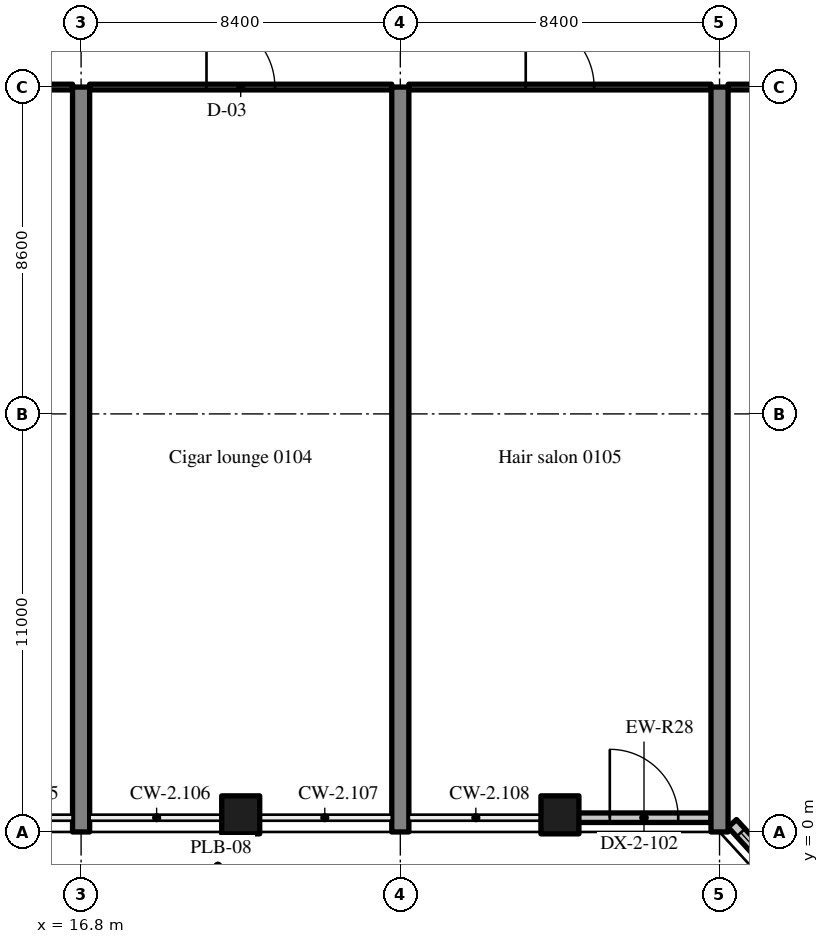
"""IFC4 building model, lengths in metres.
Left out: names, types, materials, properties, quantities, classifications, styles, units other than length and angle.
Written with IfcOpenShell. Run it as: python <this file> out.ifc"""

import sys

from ifc_helpers import new_model, si_unit, direction, frame, frame_2d, origin, origin_2d, place, context, subcontext, project, spatial, rectangle, extrude, source, transform, mapped, element, fill, save


model = new_model("IFC4")
c1 = context("Model", 3, precision=1e-05, world=origin(), true_north=direction((0.0, 1.0)))
c2 = subcontext(c1, "Body", "Model", "MODEL_VIEW")
j1 = project(units=[si_unit("LENGTHUNIT", "METRE"), si_unit("PLANEANGLEUNIT", "RADIAN")], contexts=[c1])
p1 = place(None, origin())
s1 = spatial("IfcSite", under=j1, at=p1, CompositionType="ELEMENT")
p2 = place(p1, origin())
s2 = spatial("IfcBuilding", under=s1, at=p2, CompositionType="ELEMENT")
p3 = place(p2, frame((0.0, 0.0, 6.0)))
s3 = spatial("IfcBuildingStorey", under=s2, at=p3, CompositionType="ELEMENT", Elevation=6.0)
m1 = source(origin(), c2, "Body", "SweptSolid", [
    extrude(rectangle(XDim=19.6, YDim=0.45, at=frame_2d((9.8, 0.0))), origin(), (0.0, 0.0, 1.0), 5.12),
])
for number, where, z_axis, x_axis in (
    (1, (16.8, 0.0, 0.0), (0.0, 0.0, 1.0), (0.0, 1.0, 0.0)),
    (2, (25.2, 0.0, 0.0), (0.0, 0.0, 1.0), (0.0, 1.0, 0.0)),
    (3, (33.6, 0.0, 0.0), (0.0, 0.0, 1.0), (0.0, 1.0, 0.0)),
):
    element("IfcWall", number, at=place(p3, frame(where, z_axis=z_axis, x_axis=x_axis)), inside=s3, PredefinedType="SHEAR", context=c2, shape_type="MappedRepresentation", body=[
        mapped(m1, transform((0.0, 0.0, 0.0), scale=1.0)),
    ])
m2 = source(origin(), c2, "Body", "SweptSolid", [
    extrude(rectangle(XDim=1.0, YDim=1.0, at=origin_2d()), origin(), (0.0, 0.0, 1.0), 5.12),
])
for number, where, z_axis, x_axis in (
    (4, (21.0, 0.45, 0.0), (0.0, 0.0, 1.0), (1.0, 0.0, 0.0)),
    (5, (29.4, 0.45, 0.0), (0.0, 0.0, 1.0), (1.0, 0.0, 0.0)),
):
    element("IfcColumn", number, at=place(p3, frame(where, z_axis=z_axis, x_axis=x_axis)), inside=s3, PredefinedType="COLUMN", context=c2, shape_type="MappedRepresentation", body=[
        mapped(m2, transform((0.0, 0.0, 0.0), scale=1.0)),
    ])
m3 = source(origin(), c2, "Body", "SweptSolid", [
    extrude(rectangle(XDim=3.525, YDim=0.25, at=frame_2d((1.762, 0.0))), origin(), (0.0, 0.0, 1.0), 4.37),
])
p4 = place(p3, frame((29.85, 0.375, 0.0), z_axis=(0.0, 0.0, 1.0), x_axis=(1.0, 0.0, 0.0)))
e6 = element("IfcWall", 6, at=p4, inside=s3, PredefinedType="SOLIDWALL", context=c2, shape_type="MappedRepresentation", body=[
    mapped(m3, transform((0.0, 0.0, 0.0), scale=1.0)),
])
m4 = source(origin(), c2, "Body", "SweptSolid", [
    extrude(rectangle(XDim=1.8, YDim=2.4, at=frame_2d((0.9, 1.2))), frame((0.0, 0.135, 0.0), z_axis=(0.0, -1.0, 0.0), x_axis=(1.0, 0.0, 0.0)), (0.0, 0.0, 1.0), 0.27),
])
p5 = place(p4, frame((0.863, 0.0, 0.0)))
e7 = element("IfcOpeningElement", 7, at=p5, cuts=e6, PredefinedType="OPENING", context=c2, shape_type="MappedRepresentation", body=[
    mapped(m4, transform((0.0, 0.0, 0.0), scale=1.0)),
])
m5 = source(origin(), c2, "Body", "SweptSolid", [
    extrude(rectangle(XDim=2.162, YDim=0.3, at=frame_2d((1.081, 0.0))), origin(), (0.0, 0.0, 1.0), 5.12),
])
p6 = place(p3, frame((33.936, 0.226, 0.0), z_axis=(0.0, 0.0, 1.0), x_axis=(0.67537173084, -0.737477474355, 0.0)))
e8 = element("IfcWall", 8, at=p6, inside=s3, PredefinedType="SOLIDWALL", context=c2, shape_type="MappedRepresentation", body=[
    mapped(m5, transform((0.0, 0.0, 0.0), scale=1.0)),
])
m6 = source(origin(), c2, "Body", "SweptSolid", [
    extrude(rectangle(XDim=1.5, YDim=2.0, at=frame_2d((0.75, 1.0))), frame((0.0, 0.16, 0.0), z_axis=(0.0, -1.0, 0.0), x_axis=(1.0, 0.0, 0.0)), (0.0, 0.0, 1.0), 0.32),
])
p7 = place(p6, frame((0.331, 0.0, 0.9)))
e9 = element("IfcOpeningElement", 9, at=p7, cuts=e8, PredefinedType="OPENING", context=c2, shape_type="MappedRepresentation", body=[
    mapped(m6, transform((0.0, 0.0, 0.0), scale=1.0)),
])
m7 = source(origin(), c2, "Body", "SweptSolid", [
    extrude(rectangle(XDim=7.95, YDim=0.15, at=frame_2d((3.975, 0.0))), origin(), (0.0, 0.0, 1.0), 4.42),
])
p8 = place(p3, frame((8.625, 19.6, 0.0), z_axis=(0.0, 0.0, 1.0), x_axis=(1.0, 0.0, 0.0)))
e10 = element("IfcWall", 10, at=p8, inside=s3, PredefinedType="PARTITIONING", context=c2, shape_type="MappedRepresentation", body=[
    mapped(m7, transform((0.0, 0.0, 0.0), scale=1.0)),
])
m8 = source(origin(), c2, "Body", "SweptSolid", [
    extrude(rectangle(XDim=1.8, YDim=2.1, at=frame_2d((0.9, 1.05))), frame((0.0, 0.085, 0.0), z_axis=(0.0, -1.0, 0.0), x_axis=(1.0, 0.0, 0.0)), (0.0, 0.0, 1.0), 0.17),
])
p9 = place(p8, frame((3.075, 0.0, 0.0)))
e11 = element("IfcOpeningElement", 11, at=p9, cuts=e10, PredefinedType="OPENING", context=c2, shape_type="MappedRepresentation", body=[
    mapped(m8, transform((0.0, 0.0, 0.0), scale=1.0)),
])
m9 = source(origin(), c2, "Body", "SweptSolid", [
    extrude(rectangle(XDim=7.95, YDim=0.15, at=frame_2d((3.975, 0.0))), origin(), (0.0, 0.0, 1.0), 4.42),
])
p10 = place(p3, frame((17.025, 19.6, 0.0), z_axis=(0.0, 0.0, 1.0), x_axis=(1.0, 0.0, 0.0)))
e12 = element("IfcWall", 12, at=p10, inside=s3, PredefinedType="PARTITIONING", context=c2, shape_type="MappedRepresentation", body=[
    mapped(m9, transform((0.0, 0.0, 0.0), scale=1.0)),
])
p11 = place(p10, frame((3.075, 0.0, 0.0)))
e13 = element("IfcOpeningElement", 13, at=p11, cuts=e12, PredefinedType="OPENING", context=c2, shape_type="MappedRepresentation", body=[
    mapped(m8, transform((0.0, 0.0, 0.0), scale=1.0)),
])
p12 = place(p3, frame((25.425, 19.6, 0.0), z_axis=(0.0, 0.0, 1.0), x_axis=(1.0, 0.0, 0.0)))
e14 = element("IfcWall", 14, at=p12, inside=s3, PredefinedType="PARTITIONING", context=c2, shape_type="MappedRepresentation", body=[
    mapped(m7, transform((0.0, 0.0, 0.0), scale=1.0)),
])
p13 = place(p12, frame((3.075, 0.0, 0.0)))
e15 = element("IfcOpeningElement", 15, at=p13, cuts=e14, PredefinedType="OPENING", context=c2, shape_type="MappedRepresentation", body=[
    mapped(m8, transform((0.0, 0.0, 0.0), scale=1.0)),
])
p14 = place(p3, frame((33.825, 19.6, 0.0), z_axis=(0.0, 0.0, 1.0), x_axis=(1.0, 0.0, 0.0)))
e16 = element("IfcWall", 16, at=p14, inside=s3, PredefinedType="PARTITIONING", context=c2, shape_type="MappedRepresentation", body=[
    mapped(m7, transform((0.0, 0.0, 0.0), scale=1.0)),
])
p15 = place(p14, frame((3.075, 0.0, 0.0)))
e17 = element("IfcOpeningElement", 17, at=p15, cuts=e16, PredefinedType="OPENING", context=c2, shape_type="MappedRepresentation", body=[
    mapped(m8, transform((0.0, 0.0, 0.0), scale=1.0)),
])
m10 = source(origin(), c2, "Body", "SweptSolid", [
    extrude(rectangle(XDim=1.8, YDim=2.4, at=frame_2d((0.9, 1.2))), frame((0.0, 0.025, 0.0), z_axis=(0.0, -1.0, 0.0), x_axis=(1.0, 0.0, 0.0)), (0.0, 0.0, 1.0), 0.05),
])
p16 = place(p5, origin())
e18 = element("IfcDoor", 18, at=p16, inside=s3, OperationType="DOUBLE_DOOR_SINGLE_SWING", PredefinedType="DOOR", context=c2, shape_type="MappedRepresentation", body=[
    mapped(m10, transform((0.0, 0.0, 0.0), scale=1.0)),
])
fill(e7, e18)
m11 = source(origin(), c2, "Body", "SweptSolid", [
    extrude(rectangle(XDim=1.5, YDim=2.0, at=frame_2d((0.75, 1.0))), frame((0.0, 0.03, 0.0), z_axis=(0.0, -1.0, 0.0), x_axis=(1.0, 0.0, 0.0)), (0.0, 0.0, 1.0), 0.06),
])
p17 = place(p7, origin())
e19 = element("IfcWindow", 19, at=p17, inside=s3, PartitioningType="SINGLE_PANEL", PredefinedType="WINDOW", context=c2, shape_type="MappedRepresentation", body=[
    mapped(m11, transform((0.0, 0.0, 0.0), scale=1.0)),
])
fill(e9, e19)
m12 = source(origin(), c2, "Body", "SweptSolid", [
    extrude(rectangle(XDim=1.8, YDim=2.1, at=frame_2d((0.9, 1.05))), frame((0.0, 0.025, 0.0), z_axis=(0.0, -1.0, 0.0), x_axis=(1.0, 0.0, 0.0)), (0.0, 0.0, 1.0), 0.05),
])
p18 = place(p11, origin())
e20 = element("IfcDoor", 20, at=p18, inside=s3, OperationType="DOUBLE_DOOR_SINGLE_SWING", PredefinedType="DOOR", context=c2, shape_type="MappedRepresentation", body=[
    mapped(m12, transform((0.0, 0.0, 0.0), scale=1.0)),
])
fill(e13, e20)
p19 = place(p13, origin())
e21 = element("IfcDoor", 21, at=p19, inside=s3, OperationType="DOUBLE_DOOR_SINGLE_SWING", PredefinedType="DOOR", context=c2, shape_type="MappedRepresentation", body=[
    mapped(m12, transform((0.0, 0.0, 0.0), scale=1.0)),
])
fill(e15, e21)
save(model, sys.argv[1])
